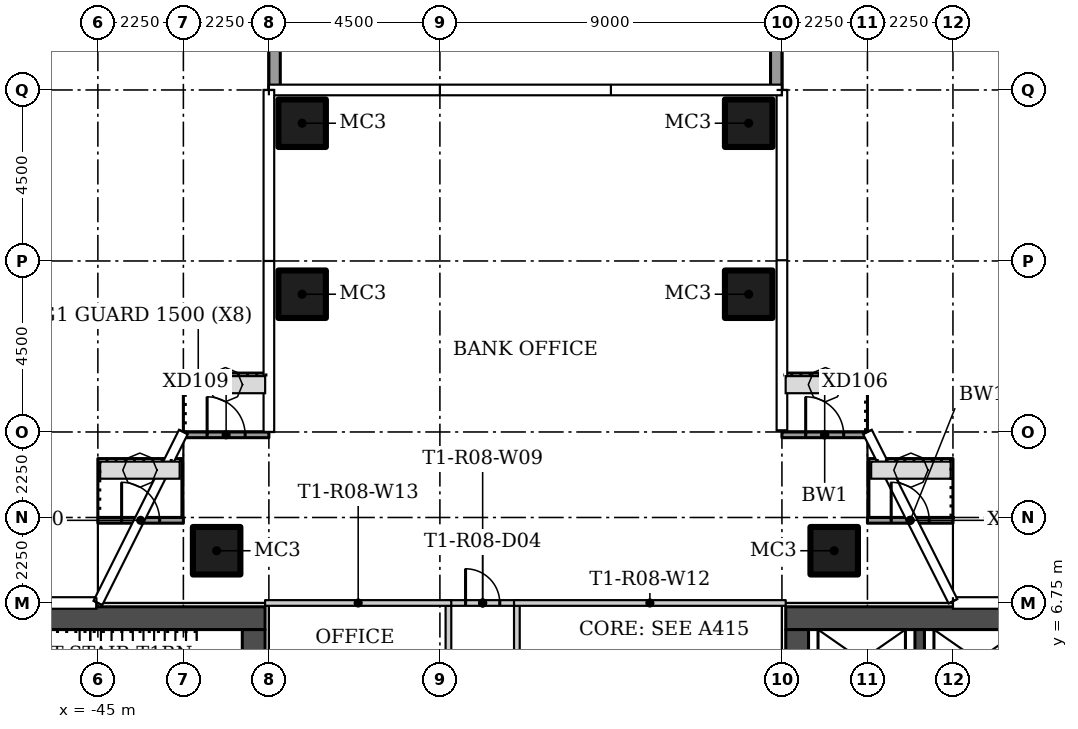
"""IFC4 building model, lengths in metres.
Left out: names, types, materials, properties, quantities, classifications, styles, units other than length and angle.
Written with IfcOpenShell. Run it as: python <this file> out.ifc"""

import sys

from ifc_helpers import new_model, si_unit, direction, frame, frame_2d, origin, origin_2d, place, context, subcontext, project, spatial, rectangle, hollow_rectangle, extrude, element, fill, save


model = new_model("IFC4")
c1 = context("Model", 3, precision=1e-05, world=origin(), true_north=direction((0.0, 1.0)))
c2 = subcontext(c1, "Body", "Model", "MODEL_VIEW")
j1 = project(units=[si_unit("LENGTHUNIT", "METRE"), si_unit("PLANEANGLEUNIT", "RADIAN")], contexts=[c1])
p1 = place(None, origin())
s1 = spatial("IfcSite", under=j1, at=p1, CompositionType="ELEMENT")
p2 = place(p1, origin())
s2 = spatial("IfcBuilding", under=s1, at=p2, CompositionType="ELEMENT")
p3 = place(p2, frame((0.0, 0.0, 81.9)))
s3 = spatial("IfcBuildingStorey", under=s2, at=p3, CompositionType="ELEMENT", Elevation=81.9)
for number, where in (
    (1, (-25.625, 8.125, 0.0)),
    (2, (-41.875, 8.125, 0.0)),
    (3, (-39.625, 14.875, 0.0)),
    (4, (-39.625, 19.375, 0.0)),
    (5, (-27.875, 14.875, 0.0)),
    (6, (-27.875, 19.375, 0.0)),
):
    element("IfcColumn", number, at=place(p3, frame(where)), inside=s3, PredefinedType="COLUMN", context=c2, shape_type="SweptSolid", body=[
        extrude(hollow_rectangle(XDim=1.25, YDim=1.25, WallThickness=0.05, at=origin_2d()), origin(), (0.0, 0.0, 1.0), 3.55),
    ])
for number, where, z_axis, x_axis in (
    (7, (-33.975, 6.675, 0.0), (0.0, 0.0, 1.0), (0.0, -1.0, 0.0)),
    (8, (-35.775, 2.525, 0.0), (0.0, 0.0, 1.0), (0.0, 1.0, 0.0)),
):
    element("IfcWall", number, at=place(p3, frame(where, z_axis=z_axis, x_axis=x_axis)), inside=s3, PredefinedType="PARTITIONING", context=c2, shape_type="SweptSolid", body=[
        extrude(rectangle(XDim=4.15, YDim=0.15, at=frame_2d((2.075, 0.0))), origin(), (0.0, 0.0, 1.0), 3.55),
    ])
p4 = place(p3, frame((-35.85, 6.75, 0.0)))
e9 = element("IfcWall", 9, at=p4, inside=s3, PredefinedType="PARTITIONING", context=c2, shape_type="SweptSolid", body=[
    extrude(rectangle(XDim=1.951, YDim=0.15, at=frame_2d((0.975, 0.0))), origin(), (0.0, 0.0, 1.0), 3.55),
])
p5 = place(p4, frame((0.525, 0.0, 0.0)))
e10 = element("IfcOpeningElement", 10, at=p5, cuts=e9, PredefinedType="OPENING", context=c2, shape_type="SweptSolid", body=[
    extrude(rectangle(XDim=0.9, YDim=2.1, at=frame_2d((0.45, 1.05))), frame((0.0, 0.085, 0.0), z_axis=(0.0, -1.0, 0.0), x_axis=(1.0, 0.0, 0.0)), (0.0, 0.0, 1.0), 0.17),
])
p6 = place(p3, frame((-26.9, 6.75, 0.0), z_axis=(0.0, 0.0, 1.0), x_axis=(-1.0, 0.0, 0.0)))
e11 = element("IfcWall", 11, at=p6, inside=s3, PredefinedType="PARTITIONING", context=c2, shape_type="SweptSolid", body=[
    extrude(rectangle(XDim=7.15, YDim=0.15, at=frame_2d((3.575, 0.0))), origin(), (0.0, 0.0, 1.0), 3.55),
])
p7 = place(p3, frame((-35.7, 6.75, 0.0), z_axis=(0.0, 0.0, 1.0), x_axis=(-1.0, 0.0, 0.0)))
e12 = element("IfcWall", 12, at=p7, inside=s3, PredefinedType="PARTITIONING", context=c2, shape_type="SweptSolid", body=[
    extrude(rectangle(XDim=4.9, YDim=0.15, at=frame_2d((2.45, 0.0))), origin(), (0.0, 0.0, 1.0), 3.55),
])
p8 = place(p3, frame((-27.15, 20.25, 0.0), z_axis=(0.0, 0.0, 1.0), x_axis=(0.0, 1.0, 0.0)))
e13 = element("IfcWall", 13, at=p8, inside=s3, PredefinedType="PARAPET", context=c2, shape_type="SweptSolid", body=[
    extrude(rectangle(XDim=4.5, YDim=0.3, at=frame_2d((2.25, 0.0))), origin(), (0.0, 0.0, 1.0), 1.1),
])
p9 = place(p3, frame((-40.35, 24.45, 0.0), z_axis=(0.0, 0.0, 1.0), x_axis=(0.0, -1.0, 0.0)))
e14 = element("IfcWall", 14, at=p9, inside=s3, PredefinedType="PARAPET", context=c2, shape_type="SweptSolid", body=[
    extrude(rectangle(XDim=4.2, YDim=0.3, at=frame_2d((2.1, 0.0))), origin(), (0.0, 0.0, 1.0), 1.1),
])
p10 = place(p3, frame((-24.75, 8.925, 0.0)))
e15 = element("IfcWall", 15, at=p10, inside=s3, PredefinedType="SOLIDWALL", context=c2, shape_type="SweptSolid", body=[
    extrude(rectangle(XDim=2.25, YDim=0.15, at=frame_2d((1.125, 0.0))), origin(), (0.0, 0.0, 1.0), 3.45),
])
p11 = place(p10, frame((0.625, 0.0, 0.0)))
e16 = element("IfcOpeningElement", 16, at=p11, cuts=e15, PredefinedType="OPENING", context=c2, shape_type="SweptSolid", body=[
    extrude(rectangle(XDim=1.0, YDim=2.4, at=frame_2d((0.5, 1.2))), frame((0.0, 0.085, 0.0), z_axis=(0.0, -1.0, 0.0), x_axis=(1.0, 0.0, 0.0)), (0.0, 0.0, 1.0), 0.17),
])
p12 = place(p3, frame((-27.0, 11.175, 0.0)))
e17 = element("IfcWall", 17, at=p12, inside=s3, PredefinedType="SOLIDWALL", context=c2, shape_type="SweptSolid", body=[
    extrude(rectangle(XDim=2.25, YDim=0.15, at=frame_2d((1.125, 0.0))), origin(), (0.0, 0.0, 1.0), 3.45),
])
p13 = place(p12, frame((0.625, 0.0, 0.0)))
e18 = element("IfcOpeningElement", 18, at=p13, cuts=e17, PredefinedType="OPENING", context=c2, shape_type="SweptSolid", body=[
    extrude(rectangle(XDim=1.0, YDim=2.4, at=frame_2d((0.5, 1.2))), frame((0.0, 0.085, 0.0), z_axis=(0.0, -1.0, 0.0), x_axis=(1.0, 0.0, 0.0)), (0.0, 0.0, 1.0), 0.17),
])
p14 = place(p3, frame((-42.75, 11.175, 0.0)))
e19 = element("IfcWall", 19, at=p14, inside=s3, PredefinedType="SOLIDWALL", context=c2, shape_type="SweptSolid", body=[
    extrude(rectangle(XDim=2.25, YDim=0.15, at=frame_2d((1.125, 0.0))), origin(), (0.0, 0.0, 1.0), 3.45),
])
p15 = place(p14, frame((0.625, 0.0, 0.0)))
e20 = element("IfcOpeningElement", 20, at=p15, cuts=e19, PredefinedType="OPENING", context=c2, shape_type="SweptSolid", body=[
    extrude(rectangle(XDim=1.0, YDim=2.4, at=frame_2d((0.5, 1.2))), frame((0.0, 0.085, 0.0), z_axis=(0.0, -1.0, 0.0), x_axis=(1.0, 0.0, 0.0)), (0.0, 0.0, 1.0), 0.17),
])
p16 = place(p3, frame((-45.0, 8.925, 0.0)))
e21 = element("IfcWall", 21, at=p16, inside=s3, PredefinedType="SOLIDWALL", context=c2, shape_type="SweptSolid", body=[
    extrude(rectangle(XDim=2.25, YDim=0.15, at=frame_2d((1.125, 0.0))), origin(), (0.0, 0.0, 1.0), 3.45),
])
p17 = place(p16, frame((0.625, 0.0, 0.0)))
e22 = element("IfcOpeningElement", 22, at=p17, cuts=e21, PredefinedType="OPENING", context=c2, shape_type="SweptSolid", body=[
    extrude(rectangle(XDim=1.0, YDim=2.4, at=frame_2d((0.5, 1.2))), frame((0.0, 0.085, 0.0), z_axis=(0.0, -1.0, 0.0), x_axis=(1.0, 0.0, 0.0)), (0.0, 0.0, 1.0), 0.17),
])
p18 = place(p3, frame((-26.9, 6.35, 0.0)))
e23 = element("IfcWall", 23, at=p18, inside=s3, PredefinedType="SHEAR", context=c2, shape_type="SweptSolid", body=[
    extrude(rectangle(XDim=13.3, YDim=0.6, at=frame_2d((6.65, 0.0))), origin(), (0.0, 0.0, 1.0), 3.55),
])
p19 = place(p3, frame((-26.6, 6.05, 0.0), z_axis=(0.0, 0.0, 1.0), x_axis=(0.0, -1.0, 0.0)))
e24 = element("IfcWall", 24, at=p19, inside=s3, PredefinedType="SHEAR", context=c2, shape_type="SweptSolid", body=[
    extrude(rectangle(XDim=12.1, YDim=0.6, at=frame_2d((6.05, 0.0))), origin(), (0.0, 0.0, 1.0), 3.55),
])
p20 = place(p19, frame((3.9, 0.0, 0.0)))
e25 = element("IfcOpeningElement", 25, at=p20, cuts=e24, PredefinedType="OPENING", context=c2, shape_type="SweptSolid", body=[
    extrude(rectangle(XDim=1.8, YDim=2.4, at=frame_2d((0.9, 1.2))), frame((0.0, 0.31, 0.0), z_axis=(0.0, -1.0, 0.0), x_axis=(1.0, 0.0, 0.0)), (0.0, 0.0, 1.0), 0.62),
])
p21 = place(p3, frame((-23.375, 3.25, 0.0), z_axis=(0.0, 0.0, 1.0), x_axis=(0.0, 1.0, 0.0)))
e26 = element("IfcWall", 26, at=p21, inside=s3, PredefinedType="SHEAR", context=c2, shape_type="SweptSolid", body=[
    extrude(rectangle(XDim=2.8, YDim=0.25, at=frame_2d((1.4, 0.0))), origin(), (0.0, 0.0, 1.0), 3.55),
])
p22 = place(p3, frame((-40.6, 6.35, 0.0), z_axis=(0.0, 0.0, 1.0), x_axis=(-1.0, 0.0, 0.0)))
e27 = element("IfcWall", 27, at=p22, inside=s3, PredefinedType="SHEAR", context=c2, shape_type="SweptSolid", body=[
    extrude(rectangle(XDim=13.3, YDim=0.6, at=frame_2d((6.65, 0.0))), origin(), (0.0, 0.0, 1.0), 3.55),
])
p23 = place(p3, frame((-40.9, -6.05, 0.0), z_axis=(0.0, 0.0, 1.0), x_axis=(0.0, 1.0, 0.0)))
e28 = element("IfcWall", 28, at=p23, inside=s3, PredefinedType="SHEAR", context=c2, shape_type="SweptSolid", body=[
    extrude(rectangle(XDim=12.1, YDim=0.6, at=frame_2d((6.05, 0.0))), origin(), (0.0, 0.0, 1.0), 3.55),
])
p24 = place(p23, frame((6.4, 0.0, 0.0)))
e29 = element("IfcOpeningElement", 29, at=p24, cuts=e28, PredefinedType="OPENING", context=c2, shape_type="SweptSolid", body=[
    extrude(rectangle(XDim=1.8, YDim=2.4, at=frame_2d((0.9, 1.2))), frame((0.0, 0.31, 0.0), z_axis=(0.0, -1.0, 0.0), x_axis=(1.0, 0.0, 0.0)), (0.0, 0.0, 1.0), 0.62),
])
p25 = place(p5, origin())
e30 = element("IfcDoor", 30, at=p25, inside=s3, OperationType="SINGLE_SWING_LEFT", PredefinedType="DOOR", context=c2, shape_type="SweptSolid", body=[
    extrude(rectangle(XDim=0.9, YDim=2.1, at=frame_2d((0.45, 1.05))), frame((0.0, 0.025, 0.0), z_axis=(0.0, -1.0, 0.0), x_axis=(1.0, 0.0, 0.0)), (0.0, 0.0, 1.0), 0.05),
])
fill(e10, e30)
p26 = place(p11, origin())
e31 = element("IfcDoor", 31, at=p26, inside=s3, OperationType="SINGLE_SWING_RIGHT", PredefinedType="DOOR", context=c2, shape_type="SweptSolid", body=[
    extrude(rectangle(XDim=1.0, YDim=2.4, at=frame_2d((0.5, 1.2))), frame((0.0, 0.025, 0.0), z_axis=(0.0, -1.0, 0.0), x_axis=(1.0, 0.0, 0.0)), (0.0, 0.0, 1.0), 0.05),
])
fill(e16, e31)
p27 = place(p13, origin())
e32 = element("IfcDoor", 32, at=p27, inside=s3, OperationType="SINGLE_SWING_LEFT", PredefinedType="DOOR", context=c2, shape_type="SweptSolid", body=[
    extrude(rectangle(XDim=1.0, YDim=2.4, at=frame_2d((0.5, 1.2))), frame((0.0, 0.025, 0.0), z_axis=(0.0, -1.0, 0.0), x_axis=(1.0, 0.0, 0.0)), (0.0, 0.0, 1.0), 0.05),
])
fill(e18, e32)
p28 = place(p15, origin())
e33 = element("IfcDoor", 33, at=p28, inside=s3, OperationType="SINGLE_SWING_LEFT", PredefinedType="DOOR", context=c2, shape_type="SweptSolid", body=[
    extrude(rectangle(XDim=1.0, YDim=2.4, at=frame_2d((0.5, 1.2))), frame((0.0, 0.025, 0.0), z_axis=(0.0, -1.0, 0.0), x_axis=(1.0, 0.0, 0.0)), (0.0, 0.0, 1.0), 0.05),
])
fill(e20, e33)
p29 = place(p17, origin())
e34 = element("IfcDoor", 34, at=p29, inside=s3, OperationType="SINGLE_SWING_RIGHT", PredefinedType="DOOR", context=c2, shape_type="SweptSolid", body=[
    extrude(rectangle(XDim=1.0, YDim=2.4, at=frame_2d((0.5, 1.2))), frame((0.0, 0.025, 0.0), z_axis=(0.0, -1.0, 0.0), x_axis=(1.0, 0.0, 0.0)), (0.0, 0.0, 1.0), 0.05),
])
fill(e22, e34)
save(model, sys.argv[1])
